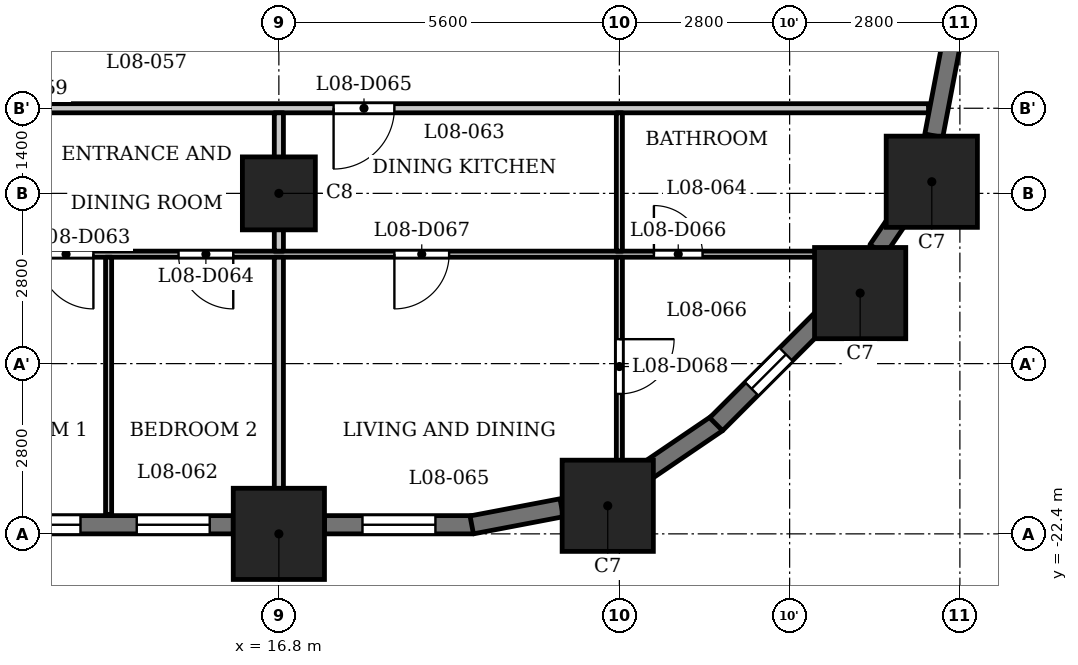
"""IFC4 building model, lengths in metres.
Left out: names, types, materials, properties, quantities, classifications, styles, units other than length and angle.
Written with IfcOpenShell. Run it as: python <this file> out.ifc"""

import sys

from ifc_helpers import new_model, si_unit, direction, frame, frame_2d, origin, origin_2d, place, context, subcontext, project, spatial, rectangle, extrude, element, fill, save


model = new_model("IFC4")
c1 = context("Model", 3, precision=1e-05, world=origin(), true_north=direction((0.0, 1.0)))
c2 = subcontext(c1, "Body", "Model", "MODEL_VIEW")
j1 = project(units=[si_unit("LENGTHUNIT", "METRE"), si_unit("PLANEANGLEUNIT", "RADIAN")], contexts=[c1])
p1 = place(None, origin())
s1 = spatial("IfcSite", under=j1, at=p1, CompositionType="ELEMENT")
p2 = place(p1, origin())
s2 = spatial("IfcBuilding", under=s1, at=p2, CompositionType="ELEMENT")
p3 = place(p2, frame((0.0, 0.0, 37.5)))
s3 = spatial("IfcBuildingStorey", under=s2, at=p3, CompositionType="ELEMENT", Elevation=37.5)
for number, where, z_axis, x_axis in (
    (1, (16.8, -22.4, 0.0), (0.0, 0.0, 1.0), (1.0, 0.0, 0.0)),
    (2, (22.209, -21.938, 0.0), (0.0, 0.0, 1.0), (1.0, 0.0, 0.0)),
    (3, (26.36, -18.44, 0.0), (0.0, 0.0, 1.0), (1.0, 0.0, 0.0)),
    (4, (27.538, -16.609, 0.0), (0.0, 0.0, 1.0), (1.0, 0.0, 0.0)),
):
    element("IfcColumn", number, at=place(p3, frame(where, z_axis=z_axis, x_axis=x_axis)), inside=s3, PredefinedType="COLUMN", context=c2, shape_type="SweptSolid", body=[
        extrude(rectangle(XDim=1.5, YDim=1.5, at=origin_2d()), origin(), (0.0, 0.0, 1.0), 3.5),
    ])
p4 = place(p3, frame((16.8, -16.8, 0.0), z_axis=(0.0, 0.0, 1.0), x_axis=(1.0, 0.0, 0.0)))
e5 = element("IfcColumn", 5, at=p4, inside=s3, PredefinedType="COLUMN", context=c2, shape_type="SweptSolid", body=[
    extrude(rectangle(XDim=1.2, YDim=1.2, at=origin_2d()), origin(), (0.0, 0.0, 1.0), 3.5),
])
p5 = place(p3, frame((11.95, -22.25, 0.0), z_axis=(0.0, 0.0, 1.0), x_axis=(1.0, 0.0, 0.0)))
e6 = element("IfcWall", 6, at=p5, inside=s3, PredefinedType="SOLIDWALL", context=c2, shape_type="SweptSolid", body=[
    extrude(rectangle(XDim=4.1, YDim=0.3, at=frame_2d((2.05, 0.0))), origin(), (0.0, 0.0, 1.0), 2.35),
])
p6 = place(p5, frame((0.387, 0.0, 0.6)))
e7 = element("IfcOpeningElement", 7, at=p6, cuts=e6, PredefinedType="OPENING", context=c2, shape_type="SweptSolid", body=[
    extrude(rectangle(XDim=1.2, YDim=1.55, at=frame_2d((0.6, 0.775))), frame((0.0, 0.16, 0.0), z_axis=(0.0, -1.0, 0.0), x_axis=(1.0, 0.0, 0.0)), (0.0, 0.0, 1.0), 0.32),
])
p7 = place(p5, frame((2.512, 0.0, 0.6)))
e8 = element("IfcOpeningElement", 8, at=p7, cuts=e6, PredefinedType="OPENING", context=c2, shape_type="SweptSolid", body=[
    extrude(rectangle(XDim=1.2, YDim=1.55, at=frame_2d((0.6, 0.775))), frame((0.0, 0.16, 0.0), z_axis=(0.0, -1.0, 0.0), x_axis=(1.0, 0.0, 0.0)), (0.0, 0.0, 1.0), 0.32),
])
p8 = place(p3, frame((17.55, -22.25, 0.0), z_axis=(0.0, 0.0, 1.0), x_axis=(1.0, 0.0, 0.0)))
e9 = element("IfcWall", 9, at=p8, inside=s3, PredefinedType="SOLIDWALL", context=c2, shape_type="SweptSolid", body=[
    extrude(rectangle(XDim=2.45, YDim=0.3, at=frame_2d((1.225, 0.0))), origin(), (0.0, 0.0, 1.0), 2.35),
])
p9 = place(p8, frame((0.625, 0.0, 0.6)))
e10 = element("IfcOpeningElement", 10, at=p9, cuts=e9, PredefinedType="OPENING", context=c2, shape_type="SweptSolid", body=[
    extrude(rectangle(XDim=1.2, YDim=1.55, at=frame_2d((0.6, 0.775))), frame((0.0, 0.16, 0.0), z_axis=(0.0, -1.0, 0.0), x_axis=(1.0, 0.0, 0.0)), (0.0, 0.0, 1.0), 0.32),
])
for number, where, z_axis, x_axis in (
    (11, (19.972, -22.253, 0.0), (0.0, 0.0, 1.0), (0.982, 0.187, 0.0)),
    (12, (22.767, -21.426, 0.0), (0.0, 0.0, 1.0), (0.827, 0.562, 0.0)),
):
    element("IfcWall", number, at=place(p3, frame(where, z_axis=z_axis, x_axis=x_axis)), inside=s3, PredefinedType="SOLIDWALL", context=c2, shape_type="SweptSolid", body=[
        extrude(rectangle(XDim=1.506, YDim=0.3, at=frame_2d((0.753, 0.0))), origin(), (0.0, 0.0, 1.0), 2.35),
    ])
p10 = place(p3, frame((23.991, -20.597, 0.0), z_axis=(0.0, 0.0, 1.0), x_axis=(0.707106781187, 0.707106781187, 0.0)))
e13 = element("IfcWall", 13, at=p10, inside=s3, PredefinedType="SOLIDWALL", context=c2, shape_type="SweptSolid", body=[
    extrude(rectangle(XDim=2.45, YDim=0.3, at=frame_2d((1.225, 0.0))), origin(), (0.0, 0.0, 1.0), 2.35),
])
p11 = place(p10, frame((0.825, 0.0, 0.6)))
e14 = element("IfcOpeningElement", 14, at=p11, cuts=e13, PredefinedType="OPENING", context=c2, shape_type="SweptSolid", body=[
    extrude(rectangle(XDim=0.8, YDim=1.55, at=frame_2d((0.4, 0.775))), frame((0.0, 0.16, 0.0), z_axis=(0.0, -1.0, 0.0), x_axis=(1.0, 0.0, 0.0)), (0.0, 0.0, 1.0), 0.32),
])
p12 = place(p3, frame((26.645, -17.727, 0.0), z_axis=(0.0, 0.0, 1.0), x_axis=(0.562083182981, 0.827080706709, 0.0)))
e15 = element("IfcWall", 15, at=p12, inside=s3, PredefinedType="SOLIDWALL", context=c2, shape_type="SweptSolid", body=[
    extrude(rectangle(XDim=0.677, YDim=0.3, at=frame_2d((0.339, 0.0))), origin(), (0.0, 0.0, 1.0), 3.2),
])
p13 = place(p3, frame((27.571, -15.851, 0.0), z_axis=(0.0, 0.0, 1.0), x_axis=(0.187223837635, 0.982317277982, 0.0)))
e16 = element("IfcWall", 16, at=p13, inside=s3, PredefinedType="SOLIDWALL", context=c2, shape_type="SweptSolid", body=[
    extrude(rectangle(XDim=1.506, YDim=0.3, at=frame_2d((0.753, 0.0))), origin(), (0.0, 0.0, 1.0), 2.35),
])
p14 = place(p3, frame((-26.394, -17.8, 0.0), z_axis=(0.0, 0.0, 1.0), x_axis=(1.0, 0.0, 0.0)))
e17 = element("IfcWall", 17, at=p14, inside=s3, PredefinedType="PARTITIONING", context=c2, shape_type="SweptSolid", body=[
    extrude(rectangle(XDim=53.126, YDim=0.1, at=frame_2d((26.563, 0.0))), origin(), (0.0, 0.0, 1.0), 3.2),
])
p15 = place(p14, frame((0.794, 0.0, 0.0)))
e18 = element("IfcOpeningElement", 18, at=p15, cuts=e17, PredefinedType="OPENING", context=c2, shape_type="SweptSolid", body=[
    extrude(rectangle(XDim=0.8, YDim=2.1, at=frame_2d((0.4, 1.05))), frame((0.0, 0.06, 0.0), z_axis=(0.0, -1.0, 0.0), x_axis=(1.0, 0.0, 0.0)), (0.0, 0.0, 1.0), 0.12),
])
p16 = place(p14, frame((5.644, 0.0, 0.0)))
e19 = element("IfcOpeningElement", 19, at=p16, cuts=e17, PredefinedType="OPENING", context=c2, shape_type="SweptSolid", body=[
    extrude(rectangle(XDim=0.9, YDim=2.1, at=frame_2d((0.45, 1.05))), frame((0.0, 0.06, 0.0), z_axis=(0.0, -1.0, 0.0), x_axis=(1.0, 0.0, 0.0)), (0.0, 0.0, 1.0), 0.12),
])
p17 = place(p14, frame((13.244, 0.0, 0.0)))
e20 = element("IfcOpeningElement", 20, at=p17, cuts=e17, PredefinedType="OPENING", context=c2, shape_type="SweptSolid", body=[
    extrude(rectangle(XDim=0.8, YDim=2.1, at=frame_2d((0.4, 1.05))), frame((0.0, 0.06, 0.0), z_axis=(0.0, -1.0, 0.0), x_axis=(1.0, 0.0, 0.0)), (0.0, 0.0, 1.0), 0.12),
])
p18 = place(p14, frame((11.494, 0.0, 0.0)))
e21 = element("IfcOpeningElement", 21, at=p18, cuts=e17, PredefinedType="OPENING", context=c2, shape_type="SweptSolid", body=[
    extrude(rectangle(XDim=0.9, YDim=2.1, at=frame_2d((0.45, 1.05))), frame((0.0, 0.06, 0.0), z_axis=(0.0, -1.0, 0.0), x_axis=(1.0, 0.0, 0.0)), (0.0, 0.0, 1.0), 0.12),
])
p19 = place(p14, frame((19.344, 0.0, 0.0)))
e22 = element("IfcOpeningElement", 22, at=p19, cuts=e17, PredefinedType="OPENING", context=c2, shape_type="SweptSolid", body=[
    extrude(rectangle(XDim=0.8, YDim=2.1, at=frame_2d((0.4, 1.05))), frame((0.0, 0.06, 0.0), z_axis=(0.0, -1.0, 0.0), x_axis=(1.0, 0.0, 0.0)), (0.0, 0.0, 1.0), 0.12),
])
p20 = place(p14, frame((16.094, 0.0, 0.0)))
e23 = element("IfcOpeningElement", 23, at=p20, cuts=e17, PredefinedType="OPENING", context=c2, shape_type="SweptSolid", body=[
    extrude(rectangle(XDim=0.9, YDim=2.1, at=frame_2d((0.45, 1.05))), frame((0.0, 0.06, 0.0), z_axis=(0.0, -1.0, 0.0), x_axis=(1.0, 0.0, 0.0)), (0.0, 0.0, 1.0), 0.12),
])
p21 = place(p14, frame((24.944, 0.0, 0.0)))
e24 = element("IfcOpeningElement", 24, at=p21, cuts=e17, PredefinedType="OPENING", context=c2, shape_type="SweptSolid", body=[
    extrude(rectangle(XDim=0.8, YDim=2.1, at=frame_2d((0.4, 1.05))), frame((0.0, 0.06, 0.0), z_axis=(0.0, -1.0, 0.0), x_axis=(1.0, 0.0, 0.0)), (0.0, 0.0, 1.0), 0.12),
])
p22 = place(p14, frame((22.444, 0.0, 0.0)))
e25 = element("IfcOpeningElement", 25, at=p22, cuts=e17, PredefinedType="OPENING", context=c2, shape_type="SweptSolid", body=[
    extrude(rectangle(XDim=0.9, YDim=2.1, at=frame_2d((0.45, 1.05))), frame((0.0, 0.06, 0.0), z_axis=(0.0, -1.0, 0.0), x_axis=(1.0, 0.0, 0.0)), (0.0, 0.0, 1.0), 0.12),
])
p23 = place(p14, frame((30.294, 0.0, 0.0)))
e26 = element("IfcOpeningElement", 26, at=p23, cuts=e17, PredefinedType="OPENING", context=c2, shape_type="SweptSolid", body=[
    extrude(rectangle(XDim=0.8, YDim=2.1, at=frame_2d((0.4, 1.05))), frame((0.0, 0.06, 0.0), z_axis=(0.0, -1.0, 0.0), x_axis=(1.0, 0.0, 0.0)), (0.0, 0.0, 1.0), 0.12),
])
p24 = place(p14, frame((26.794, 0.0, 0.0)))
e27 = element("IfcOpeningElement", 27, at=p24, cuts=e17, PredefinedType="OPENING", context=c2, shape_type="SweptSolid", body=[
    extrude(rectangle(XDim=0.9, YDim=2.1, at=frame_2d((0.45, 1.05))), frame((0.0, 0.06, 0.0), z_axis=(0.0, -1.0, 0.0), x_axis=(1.0, 0.0, 0.0)), (0.0, 0.0, 1.0), 0.12),
])
p25 = place(p14, frame((32.744, 0.0, 0.0)))
e28 = element("IfcOpeningElement", 28, at=p25, cuts=e17, PredefinedType="OPENING", context=c2, shape_type="SweptSolid", body=[
    extrude(rectangle(XDim=0.8, YDim=2.1, at=frame_2d((0.4, 1.05))), frame((0.0, 0.06, 0.0), z_axis=(0.0, -1.0, 0.0), x_axis=(1.0, 0.0, 0.0)), (0.0, 0.0, 1.0), 0.12),
])
p26 = place(p14, frame((35.594, 0.0, 0.0)))
e29 = element("IfcOpeningElement", 29, at=p26, cuts=e17, PredefinedType="OPENING", context=c2, shape_type="SweptSolid", body=[
    extrude(rectangle(XDim=0.9, YDim=2.1, at=frame_2d((0.45, 1.05))), frame((0.0, 0.06, 0.0), z_axis=(0.0, -1.0, 0.0), x_axis=(1.0, 0.0, 0.0)), (0.0, 0.0, 1.0), 0.12),
])
p27 = place(p14, frame((39.244, 0.0, 0.0)))
e30 = element("IfcOpeningElement", 30, at=p27, cuts=e17, PredefinedType="OPENING", context=c2, shape_type="SweptSolid", body=[
    extrude(rectangle(XDim=0.9, YDim=2.1, at=frame_2d((0.45, 1.05))), frame((0.0, 0.06, 0.0), z_axis=(0.0, -1.0, 0.0), x_axis=(1.0, 0.0, 0.0)), (0.0, 0.0, 1.0), 0.12),
])
p28 = place(p14, frame((41.544, 0.0, 0.0)))
e31 = element("IfcOpeningElement", 31, at=p28, cuts=e17, PredefinedType="OPENING", context=c2, shape_type="SweptSolid", body=[
    extrude(rectangle(XDim=0.9, YDim=2.1, at=frame_2d((0.45, 1.05))), frame((0.0, 0.06, 0.0), z_axis=(0.0, -1.0, 0.0), x_axis=(1.0, 0.0, 0.0)), (0.0, 0.0, 1.0), 0.12),
])
p29 = place(p14, frame((49.362, 0.0, 0.0)))
e32 = element("IfcOpeningElement", 32, at=p29, cuts=e17, PredefinedType="OPENING", context=c2, shape_type="SweptSolid", body=[
    extrude(rectangle(XDim=0.8, YDim=2.1, at=frame_2d((0.4, 1.05))), frame((0.0, 0.06, 0.0), z_axis=(0.0, -1.0, 0.0), x_axis=(1.0, 0.0, 0.0)), (0.0, 0.0, 1.0), 0.12),
])
p30 = place(p14, frame((45.094, 0.0, 0.0)))
e33 = element("IfcOpeningElement", 33, at=p30, cuts=e17, PredefinedType="OPENING", context=c2, shape_type="SweptSolid", body=[
    extrude(rectangle(XDim=0.9, YDim=2.1, at=frame_2d((0.45, 1.05))), frame((0.0, 0.06, 0.0), z_axis=(0.0, -1.0, 0.0), x_axis=(1.0, 0.0, 0.0)), (0.0, 0.0, 1.0), 0.12),
])
p31 = place(p3, frame((-27.484, -15.4, 0.0), z_axis=(0.0, 0.0, 1.0), x_axis=(1.0, 0.0, 0.0)))
e34 = element("IfcWall", 34, at=p31, inside=s3, PredefinedType="PARTITIONING", context=c2, shape_type="SweptSolid", body=[
    extrude(rectangle(XDim=54.968, YDim=0.15, at=frame_2d((27.484, 0.0))), origin(), (0.0, 0.0, 1.0), 3.2),
])
p32 = place(p31, frame((5.734, 0.0, 0.0)))
e35 = element("IfcOpeningElement", 35, at=p32, cuts=e34, PredefinedType="OPENING", context=c2, shape_type="SweptSolid", body=[
    extrude(rectangle(XDim=1.0, YDim=2.1, at=frame_2d((0.5, 1.05))), frame((0.0, 0.085, 0.0), z_axis=(0.0, -1.0, 0.0), x_axis=(1.0, 0.0, 0.0)), (0.0, 0.0, 1.0), 0.17),
])
p33 = place(p31, frame((11.584, 0.0, 0.0)))
e36 = element("IfcOpeningElement", 36, at=p33, cuts=e34, PredefinedType="OPENING", context=c2, shape_type="SweptSolid", body=[
    extrude(rectangle(XDim=1.0, YDim=2.1, at=frame_2d((0.5, 1.05))), frame((0.0, 0.085, 0.0), z_axis=(0.0, -1.0, 0.0), x_axis=(1.0, 0.0, 0.0)), (0.0, 0.0, 1.0), 0.17),
])
p34 = place(p31, frame((17.184, 0.0, 0.0)))
e37 = element("IfcOpeningElement", 37, at=p34, cuts=e34, PredefinedType="OPENING", context=c2, shape_type="SweptSolid", body=[
    extrude(rectangle(XDim=1.0, YDim=2.1, at=frame_2d((0.5, 1.05))), frame((0.0, 0.085, 0.0), z_axis=(0.0, -1.0, 0.0), x_axis=(1.0, 0.0, 0.0)), (0.0, 0.0, 1.0), 0.17),
])
p35 = place(p31, frame((22.534, 0.0, 0.0)))
e38 = element("IfcOpeningElement", 38, at=p35, cuts=e34, PredefinedType="OPENING", context=c2, shape_type="SweptSolid", body=[
    extrude(rectangle(XDim=1.0, YDim=2.1, at=frame_2d((0.5, 1.05))), frame((0.0, 0.085, 0.0), z_axis=(0.0, -1.0, 0.0), x_axis=(1.0, 0.0, 0.0)), (0.0, 0.0, 1.0), 0.17),
])
p36 = place(p31, frame((28.884, 0.0, 0.0)))
e39 = element("IfcOpeningElement", 39, at=p36, cuts=e34, PredefinedType="OPENING", context=c2, shape_type="SweptSolid", body=[
    extrude(rectangle(XDim=1.0, YDim=2.1, at=frame_2d((0.5, 1.05))), frame((0.0, 0.085, 0.0), z_axis=(0.0, -1.0, 0.0), x_axis=(1.0, 0.0, 0.0)), (0.0, 0.0, 1.0), 0.17),
])
p37 = place(p31, frame((39.334, 0.0, 0.0)))
e40 = element("IfcOpeningElement", 40, at=p37, cuts=e34, PredefinedType="OPENING", context=c2, shape_type="SweptSolid", body=[
    extrude(rectangle(XDim=1.0, YDim=2.1, at=frame_2d((0.5, 1.05))), frame((0.0, 0.085, 0.0), z_axis=(0.0, -1.0, 0.0), x_axis=(1.0, 0.0, 0.0)), (0.0, 0.0, 1.0), 0.17),
])
p38 = place(p31, frame((45.184, 0.0, 0.0)))
e41 = element("IfcOpeningElement", 41, at=p38, cuts=e34, PredefinedType="OPENING", context=c2, shape_type="SweptSolid", body=[
    extrude(rectangle(XDim=1.0, YDim=2.1, at=frame_2d((0.5, 1.05))), frame((0.0, 0.085, 0.0), z_axis=(0.0, -1.0, 0.0), x_axis=(1.0, 0.0, 0.0)), (0.0, 0.0, 1.0), 0.17),
])
p39 = place(p3, frame((14.0, -22.08, 0.0), z_axis=(0.0, 0.0, 1.0), x_axis=(0.0, 1.0, 0.0)))
e42 = element("IfcWall", 42, at=p39, inside=s3, PredefinedType="PARTITIONING", context=c2, shape_type="SweptSolid", body=[
    extrude(rectangle(XDim=4.23, YDim=0.1, at=frame_2d((2.115, 0.0))), origin(), (0.0, 0.0, 1.0), 3.2),
])
p40 = place(p3, frame((16.8, -23.13, 0.0), z_axis=(0.0, 0.0, 1.0), x_axis=(0.0, 1.0, 0.0)))
e43 = element("IfcWall", 43, at=p40, inside=s3, PredefinedType="PARTITIONING", context=c2, shape_type="SweptSolid", body=[
    extrude(rectangle(XDim=5.28, YDim=0.15, at=frame_2d((2.64, 0.0))), origin(), (0.0, 0.0, 1.0), 3.2),
])
p41 = place(p3, frame((16.8, -17.75, 0.0), z_axis=(0.0, 0.0, 1.0), x_axis=(0.0, 1.0, 0.0)))
e44 = element("IfcWall", 44, at=p41, inside=s3, PredefinedType="PARTITIONING", context=c2, shape_type="SweptSolid", body=[
    extrude(rectangle(XDim=2.275, YDim=0.15, at=frame_2d((1.137, 0.0))), origin(), (0.0, 0.0, 1.0), 3.2),
])
p42 = place(p3, frame((22.4, -21.72, 0.0), z_axis=(0.0, 0.0, 1.0), x_axis=(0.0, 1.0, 0.0)))
e45 = element("IfcWall", 45, at=p42, inside=s3, PredefinedType="PARTITIONING", context=c2, shape_type="SweptSolid", body=[
    extrude(rectangle(XDim=3.87, YDim=0.1, at=frame_2d((1.935, 0.0))), origin(), (0.0, 0.0, 1.0), 3.2),
])
p43 = place(p42, frame((1.622, 0.0, 0.0)))
e46 = element("IfcOpeningElement", 46, at=p43, cuts=e45, PredefinedType="OPENING", context=c2, shape_type="SweptSolid", body=[
    extrude(rectangle(XDim=0.9, YDim=2.1, at=frame_2d((0.45, 1.05))), frame((0.0, 0.06, 0.0), z_axis=(0.0, -1.0, 0.0), x_axis=(1.0, 0.0, 0.0)), (0.0, 0.0, 1.0), 0.12),
])
p44 = place(p3, frame((22.4, -17.75, 0.0), z_axis=(0.0, 0.0, 1.0), x_axis=(0.0, 1.0, 0.0)))
e47 = element("IfcWall", 47, at=p44, inside=s3, PredefinedType="PARTITIONING", context=c2, shape_type="SweptSolid", body=[
    extrude(rectangle(XDim=2.275, YDim=0.1, at=frame_2d((1.137, 0.0))), origin(), (0.0, 0.0, 1.0), 3.2),
])
p45 = place(p27, origin())
e48 = element("IfcDoor", 48, at=p45, inside=s3, OperationType="SINGLE_SWING_RIGHT", PredefinedType="DOOR", context=c2, shape_type="SweptSolid", body=[
    extrude(rectangle(XDim=0.9, YDim=2.1, at=frame_2d((0.45, 1.05))), frame((0.0, 0.025, 0.0), z_axis=(0.0, -1.0, 0.0), x_axis=(1.0, 0.0, 0.0)), (0.0, 0.0, 1.0), 0.05),
])
fill(e30, e48)
p46 = place(p28, origin())
e49 = element("IfcDoor", 49, at=p46, inside=s3, OperationType="SINGLE_SWING_RIGHT", PredefinedType="DOOR", context=c2, shape_type="SweptSolid", body=[
    extrude(rectangle(XDim=0.9, YDim=2.1, at=frame_2d((0.45, 1.05))), frame((0.0, 0.025, 0.0), z_axis=(0.0, -1.0, 0.0), x_axis=(1.0, 0.0, 0.0)), (0.0, 0.0, 1.0), 0.05),
])
fill(e31, e49)
p47 = place(p38, origin())
e50 = element("IfcDoor", 50, at=p47, inside=s3, OperationType="SINGLE_SWING_LEFT", PredefinedType="DOOR", context=c2, shape_type="SweptSolid", body=[
    extrude(rectangle(XDim=1.0, YDim=2.1, at=frame_2d((0.5, 1.05))), frame((0.0, 0.025, 0.0), z_axis=(0.0, -1.0, 0.0), x_axis=(1.0, 0.0, 0.0)), (0.0, 0.0, 1.0), 0.05),
])
fill(e41, e50)
p48 = place(p29, origin())
e51 = element("IfcDoor", 51, at=p48, inside=s3, OperationType="SINGLE_SWING_RIGHT", PredefinedType="DOOR", context=c2, shape_type="SweptSolid", body=[
    extrude(rectangle(XDim=0.8, YDim=2.1, at=frame_2d((0.4, 1.05))), frame((0.0, 0.025, 0.0), z_axis=(0.0, -1.0, 0.0), x_axis=(1.0, 0.0, 0.0)), (0.0, 0.0, 1.0), 0.05),
])
fill(e32, e51)
p49 = place(p30, origin())
e52 = element("IfcDoor", 52, at=p49, inside=s3, OperationType="SINGLE_SWING_LEFT", PredefinedType="DOOR", context=c2, shape_type="SweptSolid", body=[
    extrude(rectangle(XDim=0.9, YDim=2.1, at=frame_2d((0.45, 1.05))), frame((0.0, 0.025, 0.0), z_axis=(0.0, -1.0, 0.0), x_axis=(1.0, 0.0, 0.0)), (0.0, 0.0, 1.0), 0.05),
])
fill(e33, e52)
p50 = place(p43, origin())
e53 = element("IfcDoor", 53, at=p50, inside=s3, OperationType="SINGLE_SWING_RIGHT", PredefinedType="DOOR", context=c2, shape_type="SweptSolid", body=[
    extrude(rectangle(XDim=0.9, YDim=2.1, at=frame_2d((0.45, 1.05))), frame((0.0, 0.025, 0.0), z_axis=(0.0, -1.0, 0.0), x_axis=(1.0, 0.0, 0.0)), (0.0, 0.0, 1.0), 0.05),
])
fill(e46, e53)
p51 = place(p6, origin())
e54 = element("IfcWindow", 54, at=p51, inside=s3, PartitioningType="SINGLE_PANEL", PredefinedType="WINDOW", context=c2, shape_type="SweptSolid", body=[
    extrude(rectangle(XDim=1.2, YDim=1.55, at=frame_2d((0.6, 0.775))), frame((0.0, 0.03, 0.0), z_axis=(0.0, -1.0, 0.0), x_axis=(1.0, 0.0, 0.0)), (0.0, 0.0, 1.0), 0.06),
])
fill(e7, e54)
p52 = place(p7, origin())
e55 = element("IfcWindow", 55, at=p52, inside=s3, PartitioningType="SINGLE_PANEL", PredefinedType="WINDOW", context=c2, shape_type="SweptSolid", body=[
    extrude(rectangle(XDim=1.2, YDim=1.55, at=frame_2d((0.6, 0.775))), frame((0.0, 0.03, 0.0), z_axis=(0.0, -1.0, 0.0), x_axis=(1.0, 0.0, 0.0)), (0.0, 0.0, 1.0), 0.06),
])
fill(e8, e55)
p53 = place(p9, origin())
e56 = element("IfcWindow", 56, at=p53, inside=s3, PartitioningType="SINGLE_PANEL", PredefinedType="WINDOW", context=c2, shape_type="SweptSolid", body=[
    extrude(rectangle(XDim=1.2, YDim=1.55, at=frame_2d((0.6, 0.775))), frame((0.0, 0.03, 0.0), z_axis=(0.0, -1.0, 0.0), x_axis=(1.0, 0.0, 0.0)), (0.0, 0.0, 1.0), 0.06),
])
fill(e10, e56)
p54 = place(p11, origin())
e57 = element("IfcWindow", 57, at=p54, inside=s3, PartitioningType="SINGLE_PANEL", PredefinedType="WINDOW", context=c2, shape_type="SweptSolid", body=[
    extrude(rectangle(XDim=0.8, YDim=1.55, at=frame_2d((0.4, 0.775))), frame((0.0, 0.03, 0.0), z_axis=(0.0, -1.0, 0.0), x_axis=(1.0, 0.0, 0.0)), (0.0, 0.0, 1.0), 0.06),
])
fill(e14, e57)
save(model, sys.argv[1])
